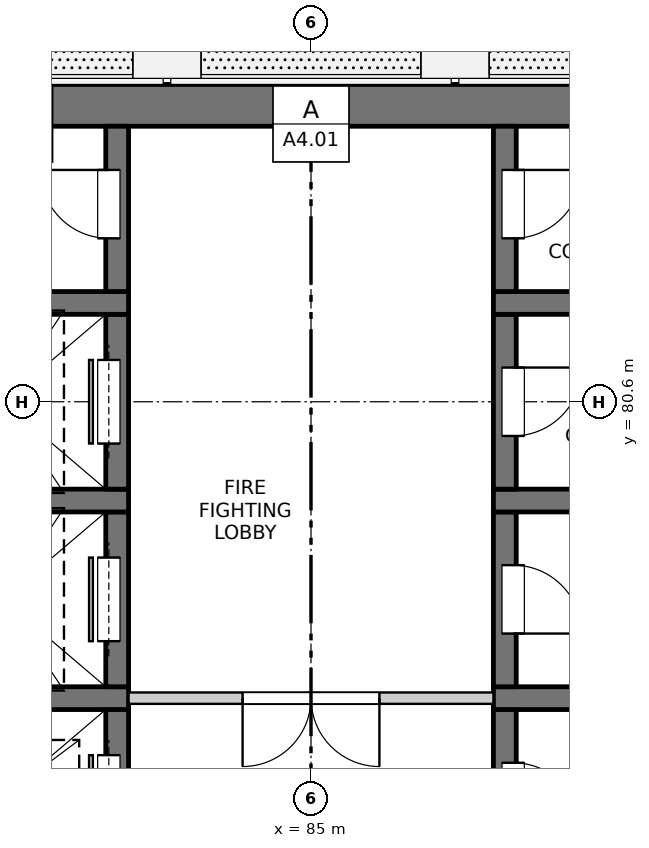
"""IFC4 building model, lengths in metres.
Left out: names, types, materials, properties, quantities, classifications, styles, units other than length and angle.
Written with IfcOpenShell. Run it as: python <this file> out.ifc"""

import sys

from ifc_helpers import new_model, si_unit, direction, frame, frame_2d, origin, place, context, subcontext, project, spatial, rectangle, extrude, element, fill, save


model = new_model("IFC4")
c1 = context("Model", 3, precision=1e-05, world=origin(), true_north=direction((0.0, 1.0)))
c2 = subcontext(c1, "Body", "Model", "MODEL_VIEW")
j1 = project(units=[si_unit("LENGTHUNIT", "METRE"), si_unit("PLANEANGLEUNIT", "RADIAN")], contexts=[c1])
p1 = place(None, origin())
s1 = spatial("IfcSite", under=j1, at=p1, CompositionType="ELEMENT")
p2 = place(p1, origin())
s2 = spatial("IfcBuilding", under=s1, at=p2, CompositionType="ELEMENT")
p3 = place(p2, frame((0.0, 0.0, 127.1)))
s3 = spatial("IfcBuildingStorey", under=s2, at=p3, CompositionType="ELEMENT", Elevation=127.1)
p4 = place(p3, frame((75.525, 84.5, -0.25), z_axis=(0.0, 0.0, 1.0), x_axis=(1.0, 0.0, 0.0)))
e1 = element("IfcWall", 1, at=p4, inside=s3, PredefinedType="SOLIDWALL", context=c2, shape_type="SweptSolid", body=[
    extrude(rectangle(XDim=18.95, YDim=0.55, at=frame_2d((9.475, 0.0))), origin(), (0.0, 0.0, 1.0), 3.4),
])
p5 = place(p3, frame((82.45, 74.25, -0.25), z_axis=(0.0, 0.0, 1.0), x_axis=(0.0, 1.0, 0.0)))
e2 = element("IfcWall", 2, at=p5, inside=s3, PredefinedType="SOLIDWALL", context=c2, shape_type="SweptSolid", body=[
    extrude(rectangle(XDim=2.3, YDim=0.3, at=frame_2d((1.15, 0.0))), origin(), (0.0, 0.0, 1.0), 3.4),
])
p6 = place(p5, frame((0.6, 0.0, 0.25)))
e3 = element("IfcOpeningElement", 3, at=p6, cuts=e2, PredefinedType="OPENING", context=c2, shape_type="SweptSolid", body=[
    extrude(rectangle(XDim=1.1, YDim=2.1, at=frame_2d((0.55, 1.05))), frame((0.0, 0.16, 0.0), z_axis=(0.0, -1.0, 0.0), x_axis=(1.0, 0.0, 0.0)), (0.0, 0.0, 1.0), 0.32),
])
p7 = place(p3, frame((79.6, 76.7, -0.25), z_axis=(0.0, 0.0, 1.0), x_axis=(1.0, 0.0, 0.0)))
e4 = element("IfcWall", 4, at=p7, inside=s3, PredefinedType="SOLIDWALL", context=c2, shape_type="SweptSolid", body=[
    extrude(rectangle(XDim=3.0, YDim=0.3, at=frame_2d((1.5, 0.0))), origin(), (0.0, 0.0, 1.0), 3.4),
])
p8 = place(p3, frame((82.45, 76.85, -0.25), z_axis=(0.0, 0.0, 1.0), x_axis=(0.0, 1.0, 0.0)))
e5 = element("IfcWall", 5, at=p8, inside=s3, PredefinedType="SOLIDWALL", context=c2, shape_type="SweptSolid", body=[
    extrude(rectangle(XDim=2.3, YDim=0.3, at=frame_2d((1.15, 0.0))), origin(), (0.0, 0.0, 1.0), 3.4),
])
p9 = place(p8, frame((0.6, 0.0, 0.25)))
e6 = element("IfcOpeningElement", 6, at=p9, cuts=e5, PredefinedType="OPENING", context=c2, shape_type="SweptSolid", body=[
    extrude(rectangle(XDim=1.1, YDim=2.1, at=frame_2d((0.55, 1.05))), frame((0.0, 0.16, 0.0), z_axis=(0.0, -1.0, 0.0), x_axis=(1.0, 0.0, 0.0)), (0.0, 0.0, 1.0), 0.32),
])
p10 = place(p3, frame((79.6, 79.3, -0.25), z_axis=(0.0, 0.0, 1.0), x_axis=(1.0, 0.0, 0.0)))
e7 = element("IfcWall", 7, at=p10, inside=s3, PredefinedType="SOLIDWALL", context=c2, shape_type="SweptSolid", body=[
    extrude(rectangle(XDim=3.0, YDim=0.3, at=frame_2d((1.5, 0.0))), origin(), (0.0, 0.0, 1.0), 3.4),
])
p11 = place(p3, frame((82.45, 79.45, -0.25), z_axis=(0.0, 0.0, 1.0), x_axis=(0.0, 1.0, 0.0)))
e8 = element("IfcWall", 8, at=p11, inside=s3, PredefinedType="SOLIDWALL", context=c2, shape_type="SweptSolid", body=[
    extrude(rectangle(XDim=2.3, YDim=0.3, at=frame_2d((1.15, 0.0))), origin(), (0.0, 0.0, 1.0), 3.4),
])
p12 = place(p11, frame((0.6, 0.0, 0.25)))
e9 = element("IfcOpeningElement", 9, at=p12, cuts=e8, PredefinedType="OPENING", context=c2, shape_type="SweptSolid", body=[
    extrude(rectangle(XDim=1.1, YDim=2.1, at=frame_2d((0.55, 1.05))), frame((0.0, 0.16, 0.0), z_axis=(0.0, -1.0, 0.0), x_axis=(1.0, 0.0, 0.0)), (0.0, 0.0, 1.0), 0.32),
])
p13 = place(p3, frame((79.6, 81.9, -0.25), z_axis=(0.0, 0.0, 1.0), x_axis=(1.0, 0.0, 0.0)))
e10 = element("IfcWall", 10, at=p13, inside=s3, PredefinedType="SOLIDWALL", context=c2, shape_type="SweptSolid", body=[
    extrude(rectangle(XDim=3.0, YDim=0.3, at=frame_2d((1.5, 0.0))), origin(), (0.0, 0.0, 1.0), 3.4),
])
p14 = place(p3, frame((82.45, 82.05, -0.25), z_axis=(0.0, 0.0, 1.0), x_axis=(0.0, 1.0, 0.0)))
e11 = element("IfcWall", 11, at=p14, inside=s3, PredefinedType="SOLIDWALL", context=c2, shape_type="SweptSolid", body=[
    extrude(rectangle(XDim=2.175, YDim=0.3, at=frame_2d((1.087, 0.0))), origin(), (0.0, 0.0, 1.0), 3.4),
])
p15 = place(p14, frame((0.7, 0.0, 0.25)))
e12 = element("IfcOpeningElement", 12, at=p15, cuts=e11, PredefinedType="OPENING", context=c2, shape_type="SweptSolid", body=[
    extrude(rectangle(XDim=0.9, YDim=2.1, at=frame_2d((0.45, 1.05))), frame((0.0, 0.16, 0.0), z_axis=(0.0, -1.0, 0.0), x_axis=(1.0, 0.0, 0.0)), (0.0, 0.0, 1.0), 0.32),
])
p16 = place(p3, frame((87.55, 74.25, -0.25), z_axis=(0.0, 0.0, 1.0), x_axis=(0.0, 1.0, 0.0)))
e13 = element("IfcWall", 13, at=p16, inside=s3, PredefinedType="SOLIDWALL", context=c2, shape_type="SweptSolid", body=[
    extrude(rectangle(XDim=2.3, YDim=0.3, at=frame_2d((1.15, 0.0))), origin(), (0.0, 0.0, 1.0), 3.4),
])
p17 = place(p16, frame((0.7, 0.0, 0.25)))
e14 = element("IfcOpeningElement", 14, at=p17, cuts=e13, PredefinedType="OPENING", context=c2, shape_type="SweptSolid", body=[
    extrude(rectangle(XDim=0.9, YDim=2.1, at=frame_2d((0.45, 1.05))), frame((0.0, 0.16, 0.0), z_axis=(0.0, -1.0, 0.0), x_axis=(1.0, 0.0, 0.0)), (0.0, 0.0, 1.0), 0.32),
])
p18 = place(p3, frame((87.4, 76.7, -0.25), z_axis=(0.0, 0.0, 1.0), x_axis=(1.0, 0.0, 0.0)))
e15 = element("IfcWall", 15, at=p18, inside=s3, PredefinedType="SOLIDWALL", context=c2, shape_type="SweptSolid", body=[
    extrude(rectangle(XDim=3.0, YDim=0.3, at=frame_2d((1.5, 0.0))), origin(), (0.0, 0.0, 1.0), 3.4),
])
p19 = place(p3, frame((87.55, 76.85, -0.25), z_axis=(0.0, 0.0, 1.0), x_axis=(0.0, 1.0, 0.0)))
e16 = element("IfcWall", 16, at=p19, inside=s3, PredefinedType="SOLIDWALL", context=c2, shape_type="SweptSolid", body=[
    extrude(rectangle(XDim=2.3, YDim=0.3, at=frame_2d((1.15, 0.0))), origin(), (0.0, 0.0, 1.0), 3.4),
])
p20 = place(p19, frame((0.7, 0.0, 0.25)))
e17 = element("IfcOpeningElement", 17, at=p20, cuts=e16, PredefinedType="OPENING", context=c2, shape_type="SweptSolid", body=[
    extrude(rectangle(XDim=0.9, YDim=2.1, at=frame_2d((0.45, 1.05))), frame((0.0, 0.16, 0.0), z_axis=(0.0, -1.0, 0.0), x_axis=(1.0, 0.0, 0.0)), (0.0, 0.0, 1.0), 0.32),
])
p21 = place(p3, frame((87.4, 79.3, -0.25), z_axis=(0.0, 0.0, 1.0), x_axis=(1.0, 0.0, 0.0)))
e18 = element("IfcWall", 18, at=p21, inside=s3, PredefinedType="SOLIDWALL", context=c2, shape_type="SweptSolid", body=[
    extrude(rectangle(XDim=3.0, YDim=0.3, at=frame_2d((1.5, 0.0))), origin(), (0.0, 0.0, 1.0), 3.4),
])
p22 = place(p3, frame((87.55, 79.45, -0.25), z_axis=(0.0, 0.0, 1.0), x_axis=(0.0, 1.0, 0.0)))
e19 = element("IfcWall", 19, at=p22, inside=s3, PredefinedType="SOLIDWALL", context=c2, shape_type="SweptSolid", body=[
    extrude(rectangle(XDim=2.3, YDim=0.3, at=frame_2d((1.15, 0.0))), origin(), (0.0, 0.0, 1.0), 3.4),
])
p23 = place(p22, frame((0.7, 0.0, 0.25)))
e20 = element("IfcOpeningElement", 20, at=p23, cuts=e19, PredefinedType="OPENING", context=c2, shape_type="SweptSolid", body=[
    extrude(rectangle(XDim=0.9, YDim=2.1, at=frame_2d((0.45, 1.05))), frame((0.0, 0.16, 0.0), z_axis=(0.0, -1.0, 0.0), x_axis=(1.0, 0.0, 0.0)), (0.0, 0.0, 1.0), 0.32),
])
p24 = place(p3, frame((87.4, 81.9, -0.25), z_axis=(0.0, 0.0, 1.0), x_axis=(1.0, 0.0, 0.0)))
e21 = element("IfcWall", 21, at=p24, inside=s3, PredefinedType="SOLIDWALL", context=c2, shape_type="SweptSolid", body=[
    extrude(rectangle(XDim=3.0, YDim=0.3, at=frame_2d((1.5, 0.0))), origin(), (0.0, 0.0, 1.0), 3.4),
])
p25 = place(p3, frame((87.55, 82.05, -0.25), z_axis=(0.0, 0.0, 1.0), x_axis=(0.0, 1.0, 0.0)))
e22 = element("IfcWall", 22, at=p25, inside=s3, PredefinedType="SOLIDWALL", context=c2, shape_type="SweptSolid", body=[
    extrude(rectangle(XDim=2.175, YDim=0.3, at=frame_2d((1.087, 0.0))), origin(), (0.0, 0.0, 1.0), 3.4),
])
p26 = place(p25, frame((0.7, 0.0, 0.25)))
e23 = element("IfcOpeningElement", 23, at=p26, cuts=e22, PredefinedType="OPENING", context=c2, shape_type="SweptSolid", body=[
    extrude(rectangle(XDim=0.9, YDim=2.1, at=frame_2d((0.45, 1.05))), frame((0.0, 0.16, 0.0), z_axis=(0.0, -1.0, 0.0), x_axis=(1.0, 0.0, 0.0)), (0.0, 0.0, 1.0), 0.32),
])
p27 = place(p3, frame((82.6, 76.7, 0.0), z_axis=(0.0, 0.0, 1.0), x_axis=(1.0, 0.0, 0.0)))
e24 = element("IfcWall", 24, at=p27, inside=s3, PredefinedType="PARTITIONING", context=c2, shape_type="SweptSolid", body=[
    extrude(rectangle(XDim=4.8, YDim=0.15, at=frame_2d((2.4, 0.0))), origin(), (0.0, 0.0, 1.0), 3.15),
])
p28 = place(p27, frame((1.5, 0.0, 0.0)))
e25 = element("IfcOpeningElement", 25, at=p28, cuts=e24, PredefinedType="OPENING", context=c2, shape_type="SweptSolid", body=[
    extrude(rectangle(XDim=1.8, YDim=2.1, at=frame_2d((0.9, 1.05))), frame((0.0, 0.085, 0.0), z_axis=(0.0, -1.0, 0.0), x_axis=(1.0, 0.0, 0.0)), (0.0, 0.0, 1.0), 0.17),
])
p29 = place(p6, origin())
e26 = element("IfcDoor", 26, at=p29, inside=s3, OperationType="SLIDING_TO_LEFT", PredefinedType="DOOR", context=c2, shape_type="SweptSolid", body=[
    extrude(rectangle(XDim=1.1, YDim=2.1, at=frame_2d((0.55, 1.05))), frame((0.0, 0.135, 0.0), z_axis=(0.0, -1.0, 0.0), x_axis=(1.0, 0.0, 0.0)), (0.0, 0.0, 1.0), 0.05),
])
fill(e3, e26)
p30 = place(p17, origin())
e27 = element("IfcDoor", 27, at=p30, inside=s3, OperationType="SINGLE_SWING_RIGHT", PredefinedType="DOOR", context=c2, shape_type="SweptSolid", body=[
    extrude(rectangle(XDim=0.9, YDim=2.1, at=frame_2d((0.45, 1.05))), frame((0.0, -0.085, 0.0), z_axis=(0.0, -1.0, 0.0), x_axis=(1.0, 0.0, 0.0)), (0.0, 0.0, 1.0), 0.05),
])
fill(e14, e27)
p31 = place(p28, origin())
e28 = element("IfcDoor", 28, at=p31, inside=s3, OperationType="DOUBLE_DOOR_SINGLE_SWING", PredefinedType="DOOR", context=c2, shape_type="SweptSolid", body=[
    extrude(rectangle(XDim=1.8, YDim=2.1, at=frame_2d((0.9, 1.05))), frame((0.0, 0.025, 0.0), z_axis=(0.0, -1.0, 0.0), x_axis=(1.0, 0.0, 0.0)), (0.0, 0.0, 1.0), 0.05),
])
fill(e25, e28)
p32 = place(p9, origin())
e29 = element("IfcDoor", 29, at=p32, inside=s3, OperationType="SLIDING_TO_LEFT", PredefinedType="DOOR", context=c2, shape_type="SweptSolid", body=[
    extrude(rectangle(XDim=1.1, YDim=2.1, at=frame_2d((0.55, 1.05))), frame((0.0, 0.135, 0.0), z_axis=(0.0, -1.0, 0.0), x_axis=(1.0, 0.0, 0.0)), (0.0, 0.0, 1.0), 0.05),
])
fill(e6, e29)
p33 = place(p20, origin())
e30 = element("IfcDoor", 30, at=p33, inside=s3, OperationType="SINGLE_SWING_RIGHT", PredefinedType="DOOR", context=c2, shape_type="SweptSolid", body=[
    extrude(rectangle(XDim=0.9, YDim=2.1, at=frame_2d((0.45, 1.05))), frame((0.0, -0.085, 0.0), z_axis=(0.0, -1.0, 0.0), x_axis=(1.0, 0.0, 0.0)), (0.0, 0.0, 1.0), 0.05),
])
fill(e17, e30)
p34 = place(p12, origin())
e31 = element("IfcDoor", 31, at=p34, inside=s3, OperationType="SLIDING_TO_LEFT", PredefinedType="DOOR", context=c2, shape_type="SweptSolid", body=[
    extrude(rectangle(XDim=1.1, YDim=2.1, at=frame_2d((0.55, 1.05))), frame((0.0, 0.135, 0.0), z_axis=(0.0, -1.0, 0.0), x_axis=(1.0, 0.0, 0.0)), (0.0, 0.0, 1.0), 0.05),
])
fill(e9, e31)
p35 = place(p23, origin())
e32 = element("IfcDoor", 32, at=p35, inside=s3, OperationType="SINGLE_SWING_LEFT", PredefinedType="DOOR", context=c2, shape_type="SweptSolid", body=[
    extrude(rectangle(XDim=0.9, YDim=2.1, at=frame_2d((0.45, 1.05))), frame((0.0, -0.085, 0.0), z_axis=(0.0, -1.0, 0.0), x_axis=(1.0, 0.0, 0.0)), (0.0, 0.0, 1.0), 0.05),
])
fill(e20, e32)
p36 = place(p15, origin())
e33 = element("IfcDoor", 33, at=p36, inside=s3, OperationType="SINGLE_SWING_RIGHT", PredefinedType="DOOR", context=c2, shape_type="SweptSolid", body=[
    extrude(rectangle(XDim=0.9, YDim=2.1, at=frame_2d((0.45, 1.05))), frame((0.0, 0.135, 0.0), z_axis=(0.0, -1.0, 0.0), x_axis=(1.0, 0.0, 0.0)), (0.0, 0.0, 1.0), 0.05),
])
fill(e12, e33)
p37 = place(p26, origin())
e34 = element("IfcDoor", 34, at=p37, inside=s3, OperationType="SINGLE_SWING_LEFT", PredefinedType="DOOR", context=c2, shape_type="SweptSolid", body=[
    extrude(rectangle(XDim=0.9, YDim=2.1, at=frame_2d((0.45, 1.05))), frame((0.0, -0.085, 0.0), z_axis=(0.0, -1.0, 0.0), x_axis=(1.0, 0.0, 0.0)), (0.0, 0.0, 1.0), 0.05),
])
fill(e23, e34)
save(model, sys.argv[1])
